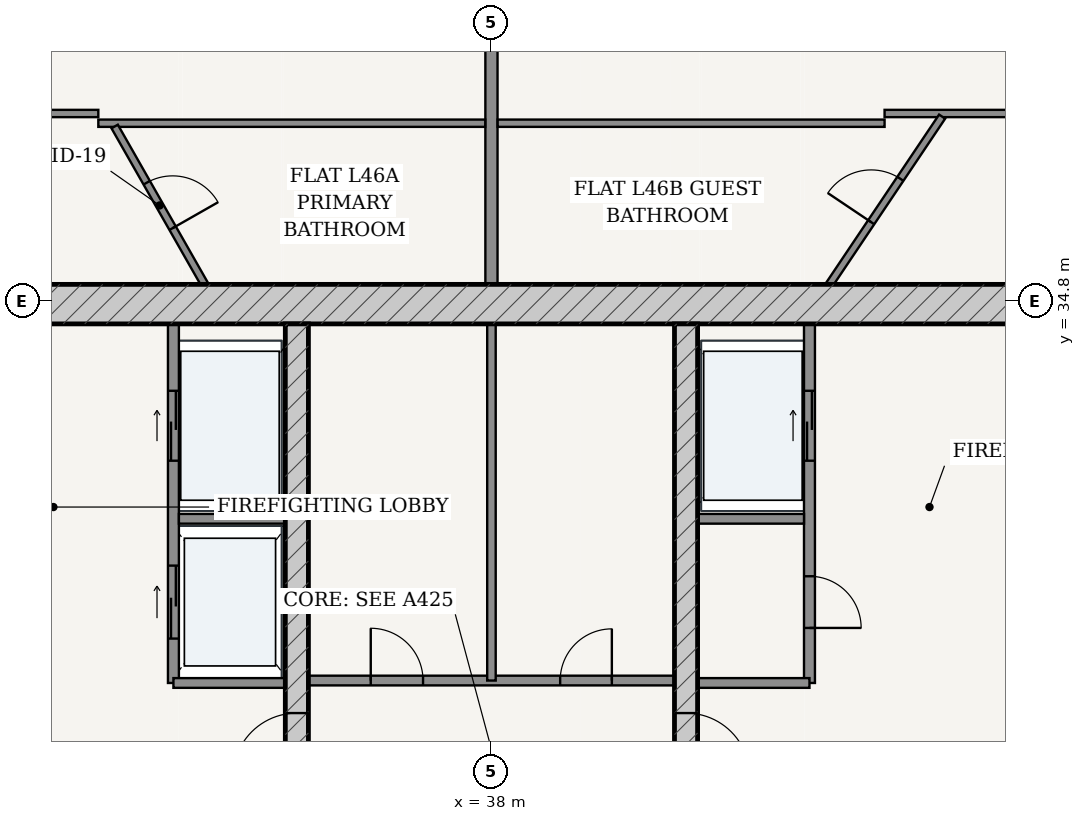
"""IFC4 building model, lengths in metres.
Left out: names, types, materials, properties, quantities, classifications, styles, units other than length and angle.
Written with IfcOpenShell. Run it as: python <this file> out.ifc"""

import sys

from ifc_helpers import new_model, si_unit, direction, frame, frame_2d, origin, place, context, subcontext, project, spatial, rectangle, extrude, source, transform, mapped, element, fill, save


model = new_model("IFC4")
c1 = context("Model", 3, precision=1e-05, world=origin(), true_north=direction((-0.2419218956, 0.970295726276)))
c2 = subcontext(c1, "Body", "Model", "MODEL_VIEW")
j1 = project(units=[si_unit("LENGTHUNIT", "METRE"), si_unit("PLANEANGLEUNIT", "RADIAN")], contexts=[c1])
p1 = place(None, origin())
s1 = spatial("IfcSite", under=j1, at=p1, CompositionType="ELEMENT")
p2 = place(p1, origin())
s2 = spatial("IfcBuilding", under=s1, at=p2, CompositionType="ELEMENT")
p3 = place(p2, frame((0.0, 0.0, 175.0)))
s3 = spatial("IfcBuildingStorey", under=s2, at=p3, CompositionType="ELEMENT", Elevation=175.0)
p4 = place(p3, frame((28.725, 34.75, 0.0), z_axis=(0.0, 0.0, 1.0), x_axis=(1.0, 0.0, 0.0)))
e1 = element("IfcWall", 1, at=p4, inside=s3, PredefinedType="SHEAR", context=c2, shape_type="SweptSolid", body=[
    extrude(rectangle(XDim=18.55, YDim=0.65, at=frame_2d((9.275, 0.0))), origin(), (0.0, 0.0, 1.0), 3.33),
])
p5 = place(p3, frame((34.8, 19.175, 0.0), z_axis=(0.0, 0.0, 1.0), x_axis=(0.0, 1.0, 0.0)))
e2 = element("IfcWall", 2, at=p5, inside=s3, PredefinedType="SHEAR", context=c2, shape_type="SweptSolid", body=[
    extrude(rectangle(XDim=15.25, YDim=0.38, at=frame_2d((7.625, 0.0))), origin(), (0.0, 0.0, 1.0), 3.33),
])
p6 = place(p5, frame((7.8, 0.0, 0.0)))
e3 = element("IfcOpeningElement", 3, at=p6, cuts=e2, PredefinedType="OPENING", context=c2, shape_type="SweptSolid", body=[
    extrude(rectangle(XDim=1.05, YDim=2.15, at=frame_2d((0.525, 1.075))), frame((0.0, 0.2, 0.0), z_axis=(0.0, -1.0, 0.0), x_axis=(1.0, 0.0, 0.0)), (0.0, 0.0, 1.0), 0.4),
])
p7 = place(p3, frame((41.2, 19.175, 0.0), z_axis=(0.0, 0.0, 1.0), x_axis=(0.0, 1.0, 0.0)))
e4 = element("IfcWall", 4, at=p7, inside=s3, PredefinedType="SHEAR", context=c2, shape_type="SweptSolid", body=[
    extrude(rectangle(XDim=15.25, YDim=0.38, at=frame_2d((7.625, 0.0))), origin(), (0.0, 0.0, 1.0), 3.33),
])
p8 = place(p7, frame((7.8, 0.0, 0.0)))
e5 = element("IfcOpeningElement", 5, at=p8, cuts=e4, PredefinedType="OPENING", context=c2, shape_type="SweptSolid", body=[
    extrude(rectangle(XDim=1.05, YDim=2.15, at=frame_2d((0.525, 1.075))), frame((0.0, 0.2, 0.0), z_axis=(0.0, -1.0, 0.0), x_axis=(1.0, 0.0, 0.0)), (0.0, 0.0, 1.0), 0.4),
])
p9 = place(p3, frame((32.77, 28.52, 0.0), z_axis=(0.0, 0.0, 1.0), x_axis=(0.0, 1.0, 0.0)))
e6 = element("IfcWall", 6, at=p9, inside=s3, PredefinedType="PARTITIONING", context=c2, shape_type="SweptSolid", body=[
    extrude(rectangle(XDim=5.905, YDim=0.18, at=frame_2d((2.953, 0.0))), origin(), (0.0, 0.0, 1.0), 3.33),
])
p10 = place(p9, frame((3.655, 0.0, 0.0)))
e7 = element("IfcOpeningElement", 7, at=p10, cuts=e6, PredefinedType="OPENING", context=c2, shape_type="SweptSolid", body=[
    extrude(rectangle(XDim=1.15, YDim=2.2, at=frame_2d((0.575, 1.1))), frame((0.0, 0.1, 0.0), z_axis=(0.0, -1.0, 0.0), x_axis=(1.0, 0.0, 0.0)), (0.0, 0.0, 1.0), 0.2),
])
p11 = place(p9, frame((0.73, 0.0, 0.0)))
e8 = element("IfcOpeningElement", 8, at=p11, cuts=e6, PredefinedType="OPENING", context=c2, shape_type="SweptSolid", body=[
    extrude(rectangle(XDim=1.2, YDim=2.25, at=frame_2d((0.6, 1.125))), frame((0.0, 0.1, 0.0), z_axis=(0.0, -1.0, 0.0), x_axis=(1.0, 0.0, 0.0)), (0.0, 0.0, 1.0), 0.2),
])
p12 = place(p3, frame((32.86, 31.22, 0.0), z_axis=(0.0, 0.0, 1.0), x_axis=(1.0, 0.0, 0.0)))
e9 = element("IfcWall", 9, at=p12, inside=s3, PredefinedType="PARTITIONING", context=c2, shape_type="SweptSolid", body=[
    extrude(rectangle(XDim=1.75, YDim=0.16, at=frame_2d((0.875, 0.0))), origin(), (0.0, 0.0, 1.0), 3.33),
])
p13 = place(p3, frame((32.77, 28.52, 0.0), z_axis=(0.0, 0.0, 1.0), x_axis=(1.0, 0.0, 0.0)))
e10 = element("IfcWall", 10, at=p13, inside=s3, PredefinedType="PARTITIONING", context=c2, shape_type="SweptSolid", body=[
    extrude(rectangle(XDim=1.84, YDim=0.16, at=frame_2d((0.92, 0.0))), origin(), (0.0, 0.0, 1.0), 3.33),
])
p14 = place(p3, frame((43.23, 28.52, 0.0), z_axis=(0.0, 0.0, 1.0), x_axis=(0.0, 1.0, 0.0)))
e11 = element("IfcWall", 11, at=p14, inside=s3, PredefinedType="PARTITIONING", context=c2, shape_type="SweptSolid", body=[
    extrude(rectangle(XDim=5.905, YDim=0.18, at=frame_2d((2.953, 0.0))), origin(), (0.0, 0.0, 1.0), 3.33),
])
p15 = place(p14, frame((0.905, 0.0, 0.0)))
e12 = element("IfcOpeningElement", 12, at=p15, cuts=e11, PredefinedType="OPENING", context=c2, shape_type="SweptSolid", body=[
    extrude(rectangle(XDim=0.85, YDim=2.1, at=frame_2d((0.425, 1.05))), frame((0.0, 0.1, 0.0), z_axis=(0.0, -1.0, 0.0), x_axis=(1.0, 0.0, 0.0)), (0.0, 0.0, 1.0), 0.2),
])
p16 = place(p14, frame((3.655, 0.0, 0.0)))
e13 = element("IfcOpeningElement", 13, at=p16, cuts=e11, PredefinedType="OPENING", context=c2, shape_type="SweptSolid", body=[
    extrude(rectangle(XDim=1.15, YDim=2.2, at=frame_2d((0.575, 1.1))), frame((0.0, 0.1, 0.0), z_axis=(0.0, -1.0, 0.0), x_axis=(1.0, 0.0, 0.0)), (0.0, 0.0, 1.0), 0.2),
])
p17 = place(p3, frame((41.39, 31.22, 0.0), z_axis=(0.0, 0.0, 1.0), x_axis=(1.0, 0.0, 0.0)))
e14 = element("IfcWall", 14, at=p17, inside=s3, PredefinedType="PARTITIONING", context=c2, shape_type="SweptSolid", body=[
    extrude(rectangle(XDim=1.75, YDim=0.16, at=frame_2d((0.875, 0.0))), origin(), (0.0, 0.0, 1.0), 3.33),
])
p18 = place(p3, frame((41.39, 28.52, 0.0), z_axis=(0.0, 0.0, 1.0), x_axis=(1.0, 0.0, 0.0)))
e15 = element("IfcWall", 15, at=p18, inside=s3, PredefinedType="PARTITIONING", context=c2, shape_type="SweptSolid", body=[
    extrude(rectangle(XDim=1.84, YDim=0.16, at=frame_2d((0.92, 0.0))), origin(), (0.0, 0.0, 1.0), 3.33),
])
p19 = place(p3, frame((34.99, 28.56, 0.0), z_axis=(0.0, 0.0, 1.0), x_axis=(1.0, 0.0, 0.0)))
e16 = element("IfcWall", 16, at=p19, inside=s3, PredefinedType="PARTITIONING", context=c2, shape_type="SweptSolid", body=[
    extrude(rectangle(XDim=6.02, YDim=0.16, at=frame_2d((3.01, 0.0))), origin(), (0.0, 0.0, 1.0), 3.33),
])
p20 = place(p19, frame((1.025, 0.0, 0.0)))
e17 = element("IfcOpeningElement", 17, at=p20, cuts=e16, PredefinedType="OPENING", context=c2, shape_type="SweptSolid", body=[
    extrude(rectangle(XDim=0.86, YDim=2.1, at=frame_2d((0.43, 1.05))), frame((0.0, 0.09, 0.0), z_axis=(0.0, -1.0, 0.0), x_axis=(1.0, 0.0, 0.0)), (0.0, 0.0, 1.0), 0.18),
])
p21 = place(p19, frame((4.14, 0.0, 0.0)))
e18 = element("IfcOpeningElement", 18, at=p21, cuts=e16, PredefinedType="OPENING", context=c2, shape_type="SweptSolid", body=[
    extrude(rectangle(XDim=0.85, YDim=2.1, at=frame_2d((0.425, 1.05))), frame((0.0, 0.09, 0.0), z_axis=(0.0, -1.0, 0.0), x_axis=(1.0, 0.0, 0.0)), (0.0, 0.0, 1.0), 0.18),
])
p22 = place(p3, frame((38.0, 28.56, 0.0), z_axis=(0.0, 0.0, 1.0), x_axis=(0.0, 1.0, 0.0)))
e19 = element("IfcWall", 19, at=p22, inside=s3, PredefinedType="PARTITIONING", context=c2, shape_type="SweptSolid", body=[
    extrude(rectangle(XDim=5.865, YDim=0.14, at=frame_2d((2.933, 0.0))), origin(), (0.0, 0.0, 1.0), 3.33),
])
p23 = place(p3, frame((38.0, 35.075, 0.0), z_axis=(0.0, 0.0, 1.0), x_axis=(0.0, 1.0, 0.0)))
e20 = element("IfcWall", 20, at=p23, inside=s3, PredefinedType="PARTITIONING", context=c2, shape_type="SweptSolid", body=[
    extrude(rectangle(XDim=12.465, YDim=0.2, at=frame_2d((6.232, 0.0))), origin(), (0.0, 0.0, 1.0), 2.415),
])
p24 = place(p3, frame((24.065, 37.885, 0.0), z_axis=(0.0, 0.0, 1.0), x_axis=(1.0, 0.0, 0.0)))
e21 = element("IfcWall", 21, at=p24, inside=s3, PredefinedType="PARTITIONING", context=c2, shape_type="SweptSolid", body=[
    extrude(rectangle(XDim=7.47, YDim=0.12, at=frame_2d((3.735, 0.0))), origin(), (0.0, 0.0, 1.0), 2.776),
])
p25 = place(p24, frame((3.62, 0.0, 0.0)))
e22 = element("IfcOpeningElement", 22, at=p25, cuts=e21, PredefinedType="OPENING", context=c2, shape_type="SweptSolid", body=[
    extrude(rectangle(XDim=0.9, YDim=2.15, at=frame_2d((0.45, 1.075))), frame((0.0, 0.07, 0.0), z_axis=(0.0, -1.0, 0.0), x_axis=(1.0, 0.0, 0.0)), (0.0, 0.0, 1.0), 0.14),
])
p26 = place(p3, frame((31.535, 37.725, 0.0), z_axis=(0.0, 0.0, 1.0), x_axis=(1.0, 0.0, 0.0)))
e23 = element("IfcWall", 23, at=p26, inside=s3, PredefinedType="PARTITIONING", context=c2, shape_type="SweptSolid", body=[
    extrude(rectangle(XDim=6.363, YDim=0.12, at=frame_2d((3.182, 0.0))), origin(), (0.0, 0.0, 1.0), 2.776),
])
p27 = place(p3, frame((33.283, 35.075, 0.0), z_axis=(0.0, 0.0, 1.0), x_axis=(-0.495179611311, 0.868790626412, 0.0)))
e24 = element("IfcWall", 24, at=p27, inside=s3, PredefinedType="PARTITIONING", context=c2, shape_type="SweptSolid", body=[
    extrude(rectangle(XDim=2.988, YDim=0.12, at=frame_2d((1.494, 0.0))), origin(), (0.0, 0.0, 1.0), 3.33),
])
p28 = place(p27, frame((1.064, 0.0, 0.0)))
e25 = element("IfcOpeningElement", 25, at=p28, cuts=e24, PredefinedType="OPENING", context=c2, shape_type="SweptSolid", body=[
    extrude(rectangle(XDim=0.86, YDim=2.15, at=frame_2d((0.43, 1.075))), frame((0.0, 0.07, 0.0), z_axis=(0.0, -1.0, 0.0), x_axis=(1.0, 0.0, 0.0)), (0.0, 0.0, 1.0), 0.14),
])
p29 = place(p3, frame((38.102, 37.725, 0.0), z_axis=(0.0, 0.0, 1.0), x_axis=(1.0, 0.0, 0.0)))
e26 = element("IfcWall", 26, at=p29, inside=s3, PredefinedType="PARTITIONING", context=c2, shape_type="SweptSolid", body=[
    extrude(rectangle(XDim=6.363, YDim=0.12, at=frame_2d((3.182, 0.0))), origin(), (0.0, 0.0, 1.0), 2.776),
])
p30 = place(p3, frame((44.465, 37.885, 0.0), z_axis=(0.0, 0.0, 1.0), x_axis=(1.0, 0.0, 0.0)))
e27 = element("IfcWall", 27, at=p30, inside=s3, PredefinedType="PARTITIONING", context=c2, shape_type="SweptSolid", body=[
    extrude(rectangle(XDim=7.47, YDim=0.12, at=frame_2d((3.735, 0.0))), origin(), (0.0, 0.0, 1.0), 2.776),
])
p31 = place(p30, frame((4.241, 0.0, 0.0)))
e28 = element("IfcOpeningElement", 28, at=p31, cuts=e27, PredefinedType="OPENING", context=c2, shape_type="SweptSolid", body=[
    extrude(rectangle(XDim=0.9, YDim=2.15, at=frame_2d((0.45, 1.075))), frame((0.0, 0.07, 0.0), z_axis=(0.0, -1.0, 0.0), x_axis=(1.0, 0.0, 0.0)), (0.0, 0.0, 1.0), 0.14),
])
p32 = place(p3, frame((43.559, 35.075, 0.0), z_axis=(0.0, 0.0, 1.0), x_axis=(0.557612855606, 0.830101140381, 0.0)))
e29 = element("IfcWall", 29, at=p32, inside=s3, PredefinedType="PARTITIONING", context=c2, shape_type="SweptSolid", body=[
    extrude(rectangle(XDim=3.323, YDim=0.12, at=frame_2d((1.662, 0.0))), origin(), (0.0, 0.0, 1.0), 3.33),
])
p33 = place(p32, frame((1.232, 0.0, 0.0)))
e30 = element("IfcOpeningElement", 30, at=p33, cuts=e29, PredefinedType="OPENING", context=c2, shape_type="SweptSolid", body=[
    extrude(rectangle(XDim=0.86, YDim=2.15, at=frame_2d((0.43, 1.075))), frame((0.0, 0.07, 0.0), z_axis=(0.0, -1.0, 0.0), x_axis=(1.0, 0.0, 0.0)), (0.0, 0.0, 1.0), 0.14),
])
m1 = source(origin(), c2, "Body", "SweptSolid", [
    extrude(rectangle(XDim=1.05, YDim=2.15, at=frame_2d((0.525, 1.075))), frame((0.0, 0.025, 0.0), z_axis=(0.0, -1.0, 0.0), x_axis=(1.0, 0.0, 0.0)), (0.0, 0.0, 1.0), 0.05),
])
p34 = place(p6, origin())
e31 = element("IfcDoor", 31, at=p34, inside=s3, OperationType="SINGLE_SWING_LEFT", PredefinedType="DOOR", context=c2, shape_type="MappedRepresentation", body=[
    mapped(m1, transform((0.0, 0.0, 0.0), scale=1.0)),
])
fill(e3, e31)
p35 = place(p8, frame((1.05, 0.0, 0.0), z_axis=(0.0, 0.0, 1.0), x_axis=(-1.0, 0.0, 0.0)))
e32 = element("IfcDoor", 32, at=p35, inside=s3, OperationType="SINGLE_SWING_RIGHT", PredefinedType="DOOR", context=c2, shape_type="MappedRepresentation", body=[
    mapped(m1, transform((0.0, 0.0, 0.0), scale=1.0)),
])
fill(e5, e32)
m2 = source(origin(), c2, "Body", "SweptSolid", [
    extrude(rectangle(XDim=0.85, YDim=2.1, at=frame_2d((0.425, 1.05))), frame((0.0, 0.025, 0.0), z_axis=(0.0, -1.0, 0.0), x_axis=(1.0, 0.0, 0.0)), (0.0, 0.0, 1.0), 0.05),
])
p36 = place(p15, frame((0.85, 0.0, 0.0), z_axis=(0.0, 0.0, 1.0), x_axis=(-1.0, 0.0, 0.0)))
e33 = element("IfcDoor", 33, at=p36, inside=s3, OperationType="SINGLE_SWING_RIGHT", PredefinedType="DOOR", context=c2, shape_type="MappedRepresentation", body=[
    mapped(m2, transform((0.0, 0.0, 0.0), scale=1.0)),
])
fill(e12, e33)
m3 = source(origin(), c2, "Body", "SweptSolid", [
    extrude(rectangle(XDim=0.86, YDim=2.1, at=frame_2d((0.43, 1.05))), frame((0.0, 0.025, 0.0), z_axis=(0.0, -1.0, 0.0), x_axis=(1.0, 0.0, 0.0)), (0.0, 0.0, 1.0), 0.05),
])
p37 = place(p20, origin())
e34 = element("IfcDoor", 34, at=p37, inside=s3, OperationType="SINGLE_SWING_LEFT", PredefinedType="DOOR", context=c2, shape_type="MappedRepresentation", body=[
    mapped(m3, transform((0.0, 0.0, 0.0), scale=1.0)),
])
fill(e17, e34)
p38 = place(p21, origin())
e35 = element("IfcDoor", 35, at=p38, inside=s3, OperationType="SINGLE_SWING_RIGHT", PredefinedType="DOOR", context=c2, shape_type="MappedRepresentation", body=[
    mapped(m2, transform((0.0, 0.0, 0.0), scale=1.0)),
])
fill(e18, e35)
m4 = source(origin(), c2, "Body", "SweptSolid", [
    extrude(rectangle(XDim=1.15, YDim=2.2, at=frame_2d((0.575, 1.1))), frame((0.0, 0.025, 0.0), z_axis=(0.0, -1.0, 0.0), x_axis=(1.0, 0.0, 0.0)), (0.0, 0.0, 1.0), 0.05),
])
p39 = place(p10, origin())
e36 = element("IfcDoor", 36, at=p39, inside=s3, OperationType="DOUBLE_DOOR_SLIDING", PredefinedType="DOOR", context=c2, shape_type="MappedRepresentation", body=[
    mapped(m4, transform((0.0, 0.0, 0.0), scale=1.0)),
])
fill(e7, e36)
p40 = place(p16, origin())
e37 = element("IfcDoor", 37, at=p40, inside=s3, OperationType="DOUBLE_DOOR_SLIDING", PredefinedType="DOOR", context=c2, shape_type="MappedRepresentation", body=[
    mapped(m4, transform((0.0, 0.0, 0.0), scale=1.0)),
])
fill(e13, e37)
m5 = source(origin(), c2, "Body", "SweptSolid", [
    extrude(rectangle(XDim=1.2, YDim=2.25, at=frame_2d((0.6, 1.125))), frame((0.0, 0.025, 0.0), z_axis=(0.0, -1.0, 0.0), x_axis=(1.0, 0.0, 0.0)), (0.0, 0.0, 1.0), 0.05),
])
p41 = place(p11, origin())
e38 = element("IfcDoor", 38, at=p41, inside=s3, OperationType="DOUBLE_DOOR_SLIDING", PredefinedType="DOOR", context=c2, shape_type="MappedRepresentation", body=[
    mapped(m5, transform((0.0, 0.0, 0.0), scale=1.0)),
])
fill(e8, e38)
m6 = source(origin(), c2, "Body", "SweptSolid", [
    extrude(rectangle(XDim=0.86, YDim=2.15, at=frame_2d((0.43, 1.075))), frame((0.0, 0.025, 0.0), z_axis=(0.0, -1.0, 0.0), x_axis=(1.0, 0.0, 0.0)), (0.0, 0.0, 1.0), 0.05),
])
p42 = place(p28, frame((0.86, 0.0, 0.0), z_axis=(0.0, 0.0, 1.0), x_axis=(-1.0, 0.0, 0.0)))
e39 = element("IfcDoor", 39, at=p42, inside=s3, OperationType="SINGLE_SWING_RIGHT", PredefinedType="DOOR", context=c2, shape_type="MappedRepresentation", body=[
    mapped(m6, transform((0.0, 0.0, 0.0), scale=1.0)),
])
fill(e25, e39)
p43 = place(p33, origin())
e40 = element("IfcDoor", 40, at=p43, inside=s3, OperationType="SINGLE_SWING_LEFT", PredefinedType="DOOR", context=c2, shape_type="MappedRepresentation", body=[
    mapped(m6, transform((0.0, 0.0, 0.0), scale=1.0)),
])
fill(e30, e40)
save(model, sys.argv[1])
